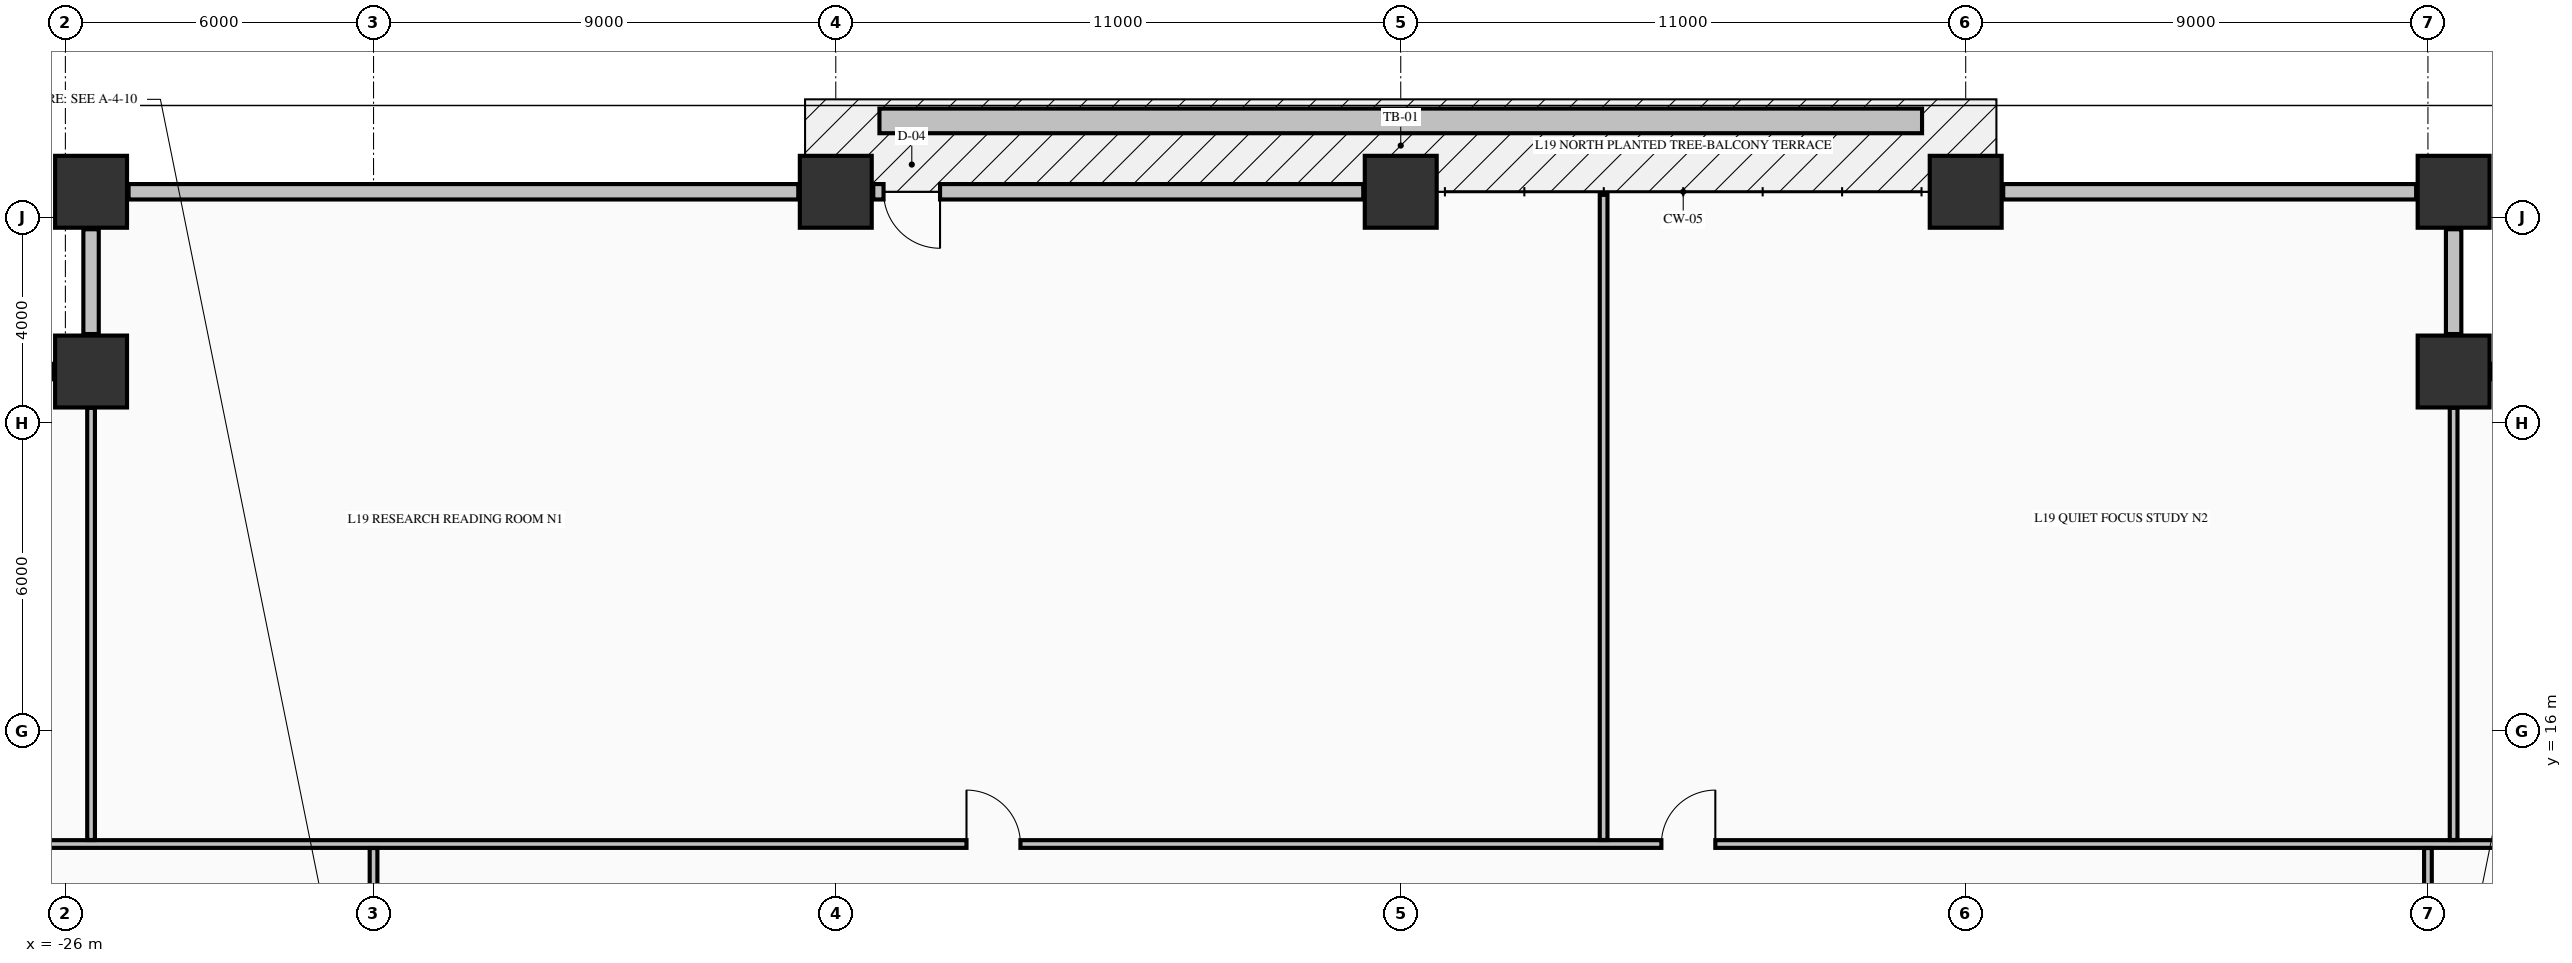
"""IFC4 building model, lengths in metres.
Left out: names, types, materials, properties, quantities, classifications, styles, units other than length and angle.
Written with IfcOpenShell. Run it as: python <this file> out.ifc"""

import sys

from ifc_helpers import new_model, si_unit, direction, frame, frame_2d, origin, origin_2d, place, context, subcontext, project, spatial, rectangle, extrude, element, fill, save


model = new_model("IFC4")
c1 = context("Model", 3, precision=1e-05, world=origin(), true_north=direction((0.0, 1.0)))
c2 = subcontext(c1, "Body", "Model", "MODEL_VIEW")
j1 = project(units=[si_unit("LENGTHUNIT", "METRE"), si_unit("PLANEANGLEUNIT", "RADIAN")], contexts=[c1])
p1 = place(None, origin())
s1 = spatial("IfcSite", under=j1, at=p1, CompositionType="ELEMENT")
p2 = place(p1, origin())
s2 = spatial("IfcBuilding", under=s1, at=p2, CompositionType="ELEMENT")
p3 = place(p2, frame((0.0, 0.0, 78.61)))
s3 = spatial("IfcBuildingStorey", under=s2, at=p3, CompositionType="ELEMENT", Elevation=78.61)
for number, where, z_axis, x_axis in (
    (1, (-25.5, 26.5, -0.25), (0.0, 0.0, 1.0), (1.0, 0.0, 0.0)),
    (2, (-11.0, 26.5, -0.25), (0.0, 0.0, 1.0), (1.0, 0.0, 0.0)),
    (3, (0.0, 26.5, -0.25), (0.0, 0.0, 1.0), (1.0, 0.0, 0.0)),
    (4, (11.0, 26.5, -0.25), (0.0, 0.0, 1.0), (1.0, 0.0, 0.0)),
    (5, (20.5, 26.5, -0.25), (0.0, 0.0, 1.0), (1.0, 0.0, 0.0)),
    (6, (20.5, 23.0, -0.25), (0.0, 0.0, 1.0), (1.0, 0.0, 0.0)),
    (7, (-25.5, 23.0, -0.25), (0.0, 0.0, 1.0), (1.0, 0.0, 0.0)),
):
    element("IfcColumn", number, at=place(p3, frame(where, z_axis=z_axis, x_axis=x_axis)), inside=s3, PredefinedType="COLUMN", context=c2, shape_type="SweptSolid", body=[
        extrude(rectangle(XDim=1.4, YDim=1.4, at=origin_2d()), origin(), (0.0, 0.0, 1.0), 3.395),
    ])
for number, where, z_axis, x_axis in (
    (8, (23.27, 23.0, 0.0), (0.0, 0.0, 1.0), (-1.0, 0.0, 0.0)),
    (9, (20.5, 23.73, 0.0), (0.0, 0.0, 1.0), (0.0, 1.0, 0.0)),
    (10, (-25.5, 25.77, 0.0), (0.0, 0.0, 1.0), (0.0, -1.0, 0.0)),
    (11, (-26.23, 23.0, 0.0), (0.0, 0.0, 1.0), (-1.0, 0.0, 0.0)),
):
    element("IfcWall", number, at=place(p3, frame(where, z_axis=z_axis, x_axis=x_axis)), inside=s3, PredefinedType="STANDARD", context=c2, shape_type="SweptSolid", body=[
        extrude(rectangle(XDim=2.04, YDim=0.3, at=frame_2d((1.02, 0.0))), origin(), (0.0, 0.0, 1.0), 2.537),
    ])
p4 = place(p3, frame((-11.73, 26.5, 0.0), z_axis=(0.0, 0.0, 1.0), x_axis=(-1.0, 0.0, 0.0)))
e12 = element("IfcWall", 12, at=p4, inside=s3, PredefinedType="STANDARD", context=c2, shape_type="SweptSolid", body=[
    extrude(rectangle(XDim=13.04, YDim=0.3, at=frame_2d((6.52, 0.0))), origin(), (0.0, 0.0, 1.0), 2.537),
])
p5 = place(p3, frame((-0.73, 26.5, 0.0), z_axis=(0.0, 0.0, 1.0), x_axis=(-1.0, 0.0, 0.0)))
e13 = element("IfcWall", 13, at=p5, inside=s3, PredefinedType="STANDARD", context=c2, shape_type="SweptSolid", body=[
    extrude(rectangle(XDim=9.54, YDim=0.3, at=frame_2d((4.77, 0.0))), origin(), (0.0, 0.0, 1.0), 2.537),
])
p6 = place(p5, frame((8.24, 0.0, 0.0)))
e14 = element("IfcOpeningElement", 14, at=p6, cuts=e13, PredefinedType="OPENING", context=c2, shape_type="SweptSolid", body=[
    extrude(rectangle(XDim=1.1, YDim=2.15, at=frame_2d((0.55, 1.075))), frame((0.0, 0.16, 0.0), z_axis=(0.0, -1.0, 0.0), x_axis=(1.0, 0.0, 0.0)), (0.0, 0.0, 1.0), 0.32),
])
p7 = place(p3, frame((19.77, 26.5, 0.0), z_axis=(0.0, 0.0, 1.0), x_axis=(-1.0, 0.0, 0.0)))
e15 = element("IfcWall", 15, at=p7, inside=s3, PredefinedType="STANDARD", context=c2, shape_type="SweptSolid", body=[
    extrude(rectangle(XDim=8.04, YDim=0.3, at=frame_2d((4.02, 0.0))), origin(), (0.0, 0.0, 1.0), 2.537),
])
p8 = place(p3, frame((-28.835, 13.8, 0.0), z_axis=(0.0, 0.0, 1.0), x_axis=(1.0, 0.0, 0.0)))
e16 = element("IfcWall", 16, at=p8, inside=s3, PredefinedType="PARTITIONING", context=c2, shape_type="SweptSolid", body=[
    extrude(rectangle(XDim=52.67, YDim=0.15, at=frame_2d((26.335, 0.0))), origin(), (0.0, 0.0, 1.0), 3.145),
])
p9 = place(p8, frame((20.38, 0.0, 0.0)))
e17 = element("IfcOpeningElement", 17, at=p9, cuts=e16, PredefinedType="OPENING", context=c2, shape_type="SweptSolid", body=[
    extrude(rectangle(XDim=1.05, YDim=2.15, at=frame_2d((0.525, 1.075))), frame((0.0, 0.085, 0.0), z_axis=(0.0, -1.0, 0.0), x_axis=(1.0, 0.0, 0.0)), (0.0, 0.0, 1.0), 0.17),
])
p10 = place(p8, frame((33.91, 0.0, 0.0)))
e18 = element("IfcOpeningElement", 18, at=p10, cuts=e16, PredefinedType="OPENING", context=c2, shape_type="SweptSolid", body=[
    extrude(rectangle(XDim=1.05, YDim=2.15, at=frame_2d((0.525, 1.075))), frame((0.0, 0.085, 0.0), z_axis=(0.0, -1.0, 0.0), x_axis=(1.0, 0.0, 0.0)), (0.0, 0.0, 1.0), 0.17),
])
p11 = place(p3, frame((-25.5, 13.878, 0.0), z_axis=(0.0, 0.0, 1.0), x_axis=(0.0, 1.0, 0.0)))
e19 = element("IfcWall", 19, at=p11, inside=s3, PredefinedType="PARTITIONING", context=c2, shape_type="SweptSolid", body=[
    extrude(rectangle(XDim=8.416, YDim=0.15, at=frame_2d((4.208, 0.0))), origin(), (0.0, 0.0, 1.0), 3.145),
])
p12 = place(p3, frame((-20.0, 11.106, 0.0), z_axis=(0.0, 0.0, 1.0), x_axis=(0.0, 1.0, 0.0)))
e20 = element("IfcWall", 20, at=p12, inside=s3, PredefinedType="PARTITIONING", context=c2, shape_type="SweptSolid", body=[
    extrude(rectangle(XDim=2.616, YDim=0.15, at=frame_2d((1.308, 0.0))), origin(), (0.0, 0.0, 1.0), 2.485),
])
p13 = place(p12, frame((0.569, 0.0, 0.0)))
e21 = element("IfcOpeningElement", 21, at=p13, cuts=e20, PredefinedType="OPENING", context=c2, shape_type="SweptSolid", body=[
    extrude(rectangle(XDim=0.95, YDim=2.15, at=frame_2d((0.475, 1.075))), frame((0.0, 0.085, 0.0), z_axis=(0.0, -1.0, 0.0), x_axis=(1.0, 0.0, 0.0)), (0.0, 0.0, 1.0), 0.17),
])
p14 = place(p3, frame((3.95, 13.878, 0.0), z_axis=(0.0, 0.0, 1.0), x_axis=(0.0, 1.0, 0.0)))
e22 = element("IfcWall", 22, at=p14, inside=s3, PredefinedType="PARTITIONING", context=c2, shape_type="SweptSolid", body=[
    extrude(rectangle(XDim=12.562, YDim=0.15, at=frame_2d((6.281, 0.0))), origin(), (0.0, 0.0, 1.0), 3.145),
])
p15 = place(p3, frame((20.0, 11.106, 0.0), z_axis=(0.0, 0.0, 1.0), x_axis=(0.0, 1.0, 0.0)))
e23 = element("IfcWall", 23, at=p15, inside=s3, PredefinedType="PARTITIONING", context=c2, shape_type="SweptSolid", body=[
    extrude(rectangle(XDim=2.616, YDim=0.15, at=frame_2d((1.308, 0.0))), origin(), (0.0, 0.0, 1.0), 3.145),
])
p16 = place(p15, frame((0.569, 0.0, 0.0)))
e24 = element("IfcOpeningElement", 24, at=p16, cuts=e23, PredefinedType="OPENING", context=c2, shape_type="SweptSolid", body=[
    extrude(rectangle(XDim=0.95, YDim=2.15, at=frame_2d((0.475, 1.075))), frame((0.0, 0.085, 0.0), z_axis=(0.0, -1.0, 0.0), x_axis=(1.0, 0.0, 0.0)), (0.0, 0.0, 1.0), 0.17),
])
p17 = place(p3, frame((20.5, 13.878, 0.0), z_axis=(0.0, 0.0, 1.0), x_axis=(0.0, 1.0, 0.0)))
e25 = element("IfcWall", 25, at=p17, inside=s3, PredefinedType="PARTITIONING", context=c2, shape_type="SweptSolid", body=[
    extrude(rectangle(XDim=8.416, YDim=0.15, at=frame_2d((4.208, 0.0))), origin(), (0.0, 0.0, 1.0), 3.145),
])
p18 = place(p3, frame((-10.15, 27.88, -0.04), z_axis=(0.0, 0.0, 1.0), x_axis=(1.0, 0.0, 0.0)))
e26 = element("IfcWall", 26, at=p18, inside=s3, PredefinedType="PARAPET", context=c2, shape_type="SweptSolid", body=[
    extrude(rectangle(XDim=20.3, YDim=0.48, at=frame_2d((10.15, 0.0))), origin(), (0.0, 0.0, 1.0), 0.52),
])
p19 = place(p6, origin())
e27 = element("IfcDoor", 27, at=p19, inside=s3, OperationType="SINGLE_SWING_LEFT", PredefinedType="DOOR", context=c2, shape_type="SweptSolid", body=[
    extrude(rectangle(XDim=1.1, YDim=2.15, at=frame_2d((0.55, 1.075))), frame((0.0, 0.025, 0.0), z_axis=(0.0, -1.0, 0.0), x_axis=(1.0, 0.0, 0.0)), (0.0, 0.0, 1.0), 0.05),
])
fill(e14, e27)
p20 = place(p9, origin())
e28 = element("IfcDoor", 28, at=p20, inside=s3, OperationType="SINGLE_SWING_LEFT", PredefinedType="DOOR", context=c2, shape_type="SweptSolid", body=[
    extrude(rectangle(XDim=1.05, YDim=2.15, at=frame_2d((0.525, 1.075))), frame((0.0, 0.025, 0.0), z_axis=(0.0, -1.0, 0.0), x_axis=(1.0, 0.0, 0.0)), (0.0, 0.0, 1.0), 0.05),
])
fill(e17, e28)
p21 = place(p10, origin())
e29 = element("IfcDoor", 29, at=p21, inside=s3, OperationType="SINGLE_SWING_RIGHT", PredefinedType="DOOR", context=c2, shape_type="SweptSolid", body=[
    extrude(rectangle(XDim=1.05, YDim=2.15, at=frame_2d((0.525, 1.075))), frame((0.0, 0.025, 0.0), z_axis=(0.0, -1.0, 0.0), x_axis=(1.0, 0.0, 0.0)), (0.0, 0.0, 1.0), 0.05),
])
fill(e18, e29)
save(model, sys.argv[1])
